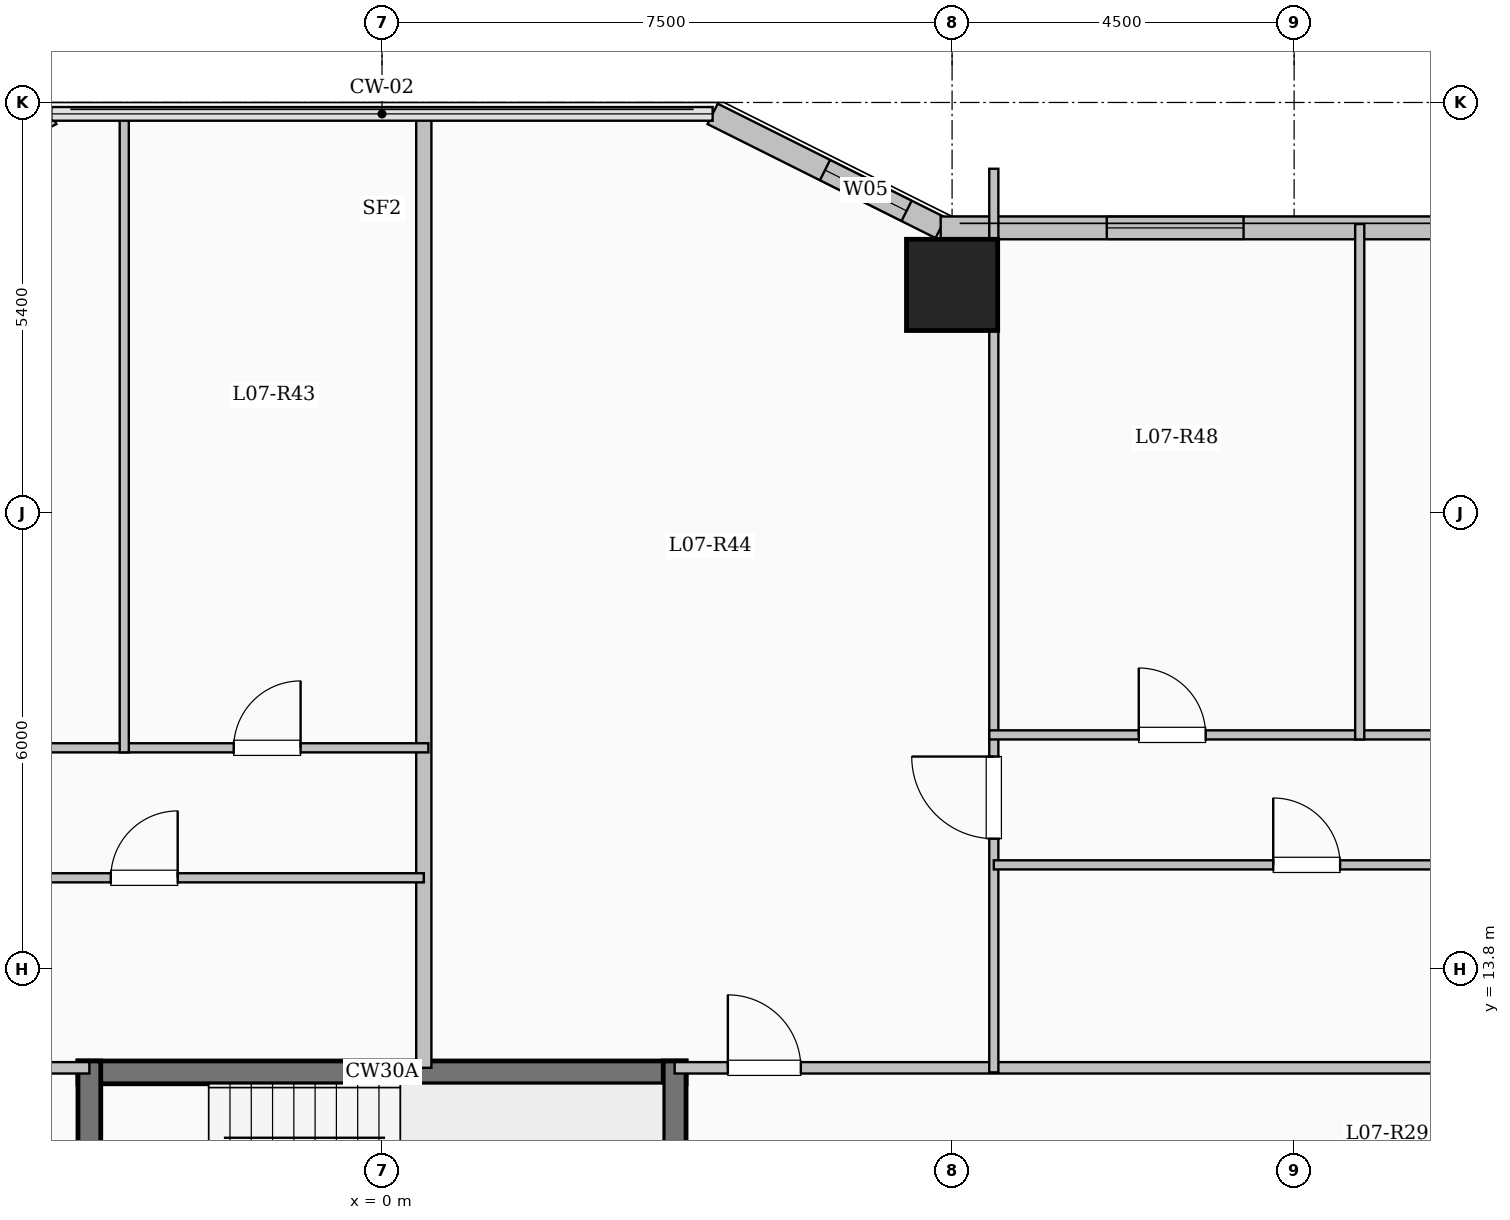
"""IFC4 building model, lengths in metres.
Left out: names, types, materials, properties, quantities, classifications, styles, units other than length and angle.
Written with IfcOpenShell. Run it as: python <this file> out.ifc"""

import sys

from ifc_helpers import new_model, si_unit, direction, frame, frame_2d, origin, origin_2d, place, context, subcontext, project, spatial, rectangle, extrude, element, fill, save


model = new_model("IFC4")
c1 = context("Model", 3, precision=1e-05, world=origin(), true_north=direction((0.0, 1.0)))
c2 = subcontext(c1, "Body", "Model", "MODEL_VIEW")
j1 = project(units=[si_unit("LENGTHUNIT", "METRE"), si_unit("PLANEANGLEUNIT", "RADIAN")], contexts=[c1])
p1 = place(None, origin())
s1 = spatial("IfcSite", under=j1, at=p1, CompositionType="ELEMENT")
p2 = place(p1, origin())
s2 = spatial("IfcBuilding", under=s1, at=p2, CompositionType="ELEMENT")
p3 = place(p2, frame((0.0, 0.0, 30.7)))
s3 = spatial("IfcBuildingStorey", under=s2, at=p3, CompositionType="ELEMENT", Elevation=30.7)
p4 = place(p3, frame((7.5, 22.8, 0.0), z_axis=(0.0, 0.0, 1.0), x_axis=(1.0, 0.0, 0.0)))
e1 = element("IfcColumn", 1, at=p4, inside=s3, PredefinedType="COLUMN", context=c2, shape_type="SweptSolid", body=[
    extrude(rectangle(XDim=1.2, YDim=1.2, at=origin_2d()), origin(), (0.0, 0.0, 1.0), 3.35),
])
p5 = place(p3, frame((-7.35, 23.55, 0.0), z_axis=(0.0, 0.0, 1.0), x_axis=(0.894427191, 0.4472135955, 0.0)))
e2 = element("IfcWall", 2, at=p5, inside=s3, PredefinedType="SOLIDWALL", context=c2, shape_type="SweptSolid", body=[
    extrude(rectangle(XDim=3.354, YDim=0.3, at=frame_2d((1.677, 0.0))), origin(), (0.0, 0.0, 1.0), 3.1),
])
p6 = place(p5, frame((0.777, 0.0, 0.9)))
e3 = element("IfcOpeningElement", 3, at=p6, cuts=e2, PredefinedType="OPENING", context=c2, shape_type="SweptSolid", body=[
    extrude(rectangle(XDim=1.8, YDim=1.65, at=frame_2d((0.9, 0.825))), frame((0.0, 0.16, 0.0), z_axis=(0.0, -1.0, 0.0), x_axis=(1.0, 0.0, 0.0)), (0.0, 0.0, 1.0), 0.32),
])
p7 = place(p3, frame((4.35, 25.05, 0.0), z_axis=(0.0, 0.0, 1.0), x_axis=(0.894427191, -0.4472135955, 0.0)))
e4 = element("IfcWall", 4, at=p7, inside=s3, PredefinedType="SOLIDWALL", context=c2, shape_type="SweptSolid", body=[
    extrude(rectangle(XDim=3.354, YDim=0.3, at=frame_2d((1.677, 0.0))), origin(), (0.0, 0.0, 1.0), 3.1),
])
p8 = place(p7, frame((1.653, 0.0, 0.95)))
e5 = element("IfcOpeningElement", 5, at=p8, cuts=e4, PredefinedType="OPENING", context=c2, shape_type="SweptSolid", body=[
    extrude(rectangle(XDim=1.2, YDim=1.5, at=frame_2d((0.6, 0.75))), frame((0.0, 0.16, 0.0), z_axis=(0.0, -1.0, 0.0), x_axis=(1.0, 0.0, 0.0)), (0.0, 0.0, 1.0), 0.32),
])
p9 = place(p3, frame((7.35, 23.55, 0.0), z_axis=(0.0, 0.0, 1.0), x_axis=(1.0, 0.0, 0.0)))
e6 = element("IfcWall", 6, at=p9, inside=s3, PredefinedType="SOLIDWALL", context=c2, shape_type="SweptSolid", body=[
    extrude(rectangle(XDim=15.3, YDim=0.3, at=frame_2d((7.65, 0.0))), origin(), (0.0, 0.0, 1.0), 3.1),
])
p10 = place(p9, frame((2.185, 0.0, 0.9)))
e7 = element("IfcOpeningElement", 7, at=p10, cuts=e6, PredefinedType="OPENING", context=c2, shape_type="SweptSolid", body=[
    extrude(rectangle(XDim=1.8, YDim=1.65, at=frame_2d((0.9, 0.825))), frame((0.0, 0.16, 0.0), z_axis=(0.0, -1.0, 0.0), x_axis=(1.0, 0.0, 0.0)), (0.0, 0.0, 1.0), 0.32),
])
p11 = place(p9, frame((7.001, 0.0, 0.9)))
e8 = element("IfcOpeningElement", 8, at=p11, cuts=e6, PredefinedType="OPENING", context=c2, shape_type="SweptSolid", body=[
    extrude(rectangle(XDim=1.8, YDim=1.65, at=frame_2d((0.9, 0.825))), frame((0.0, 0.16, 0.0), z_axis=(0.0, -1.0, 0.0), x_axis=(1.0, 0.0, 0.0)), (0.0, 0.0, 1.0), 0.32),
])
p12 = place(p9, frame((11.867, 0.0, 0.9)))
e9 = element("IfcOpeningElement", 9, at=p12, cuts=e6, PredefinedType="OPENING", context=c2, shape_type="SweptSolid", body=[
    extrude(rectangle(XDim=1.8, YDim=1.65, at=frame_2d((0.9, 0.825))), frame((0.0, 0.16, 0.0), z_axis=(0.0, -1.0, 0.0), x_axis=(1.0, 0.0, 0.0)), (0.0, 0.0, 1.0), 0.32),
])
p13 = place(p3, frame((-4.0, 12.44, 0.0), z_axis=(0.0, 0.0, 1.0), x_axis=(1.0, 0.0, 0.0)))
e10 = element("IfcWall", 10, at=p13, inside=s3, PredefinedType="SHEAR", context=c2, shape_type="SweptSolid", body=[
    extrude(rectangle(XDim=8.0, YDim=0.3, at=frame_2d((4.0, 0.0))), origin(), (0.0, 0.0, 1.0), 3.35),
])
for number, where, z_axis, x_axis in (
    (11, (-3.85, 9.0, 0.0), (0.0, 0.0, 1.0), (0.0, 1.0, 0.0)),
    (12, (3.85, 9.0, 0.0), (0.0, 0.0, 1.0), (0.0, 1.0, 0.0)),
):
    element("IfcWall", number, at=place(p3, frame(where, z_axis=z_axis, x_axis=x_axis)), inside=s3, PredefinedType="SHEAR", context=c2, shape_type="SweptSolid", body=[
        extrude(rectangle(XDim=3.59, YDim=0.3, at=frame_2d((1.795, 0.0))), origin(), (0.0, 0.0, 1.0), 3.35),
    ])
p14 = place(p3, frame((-22.55, 12.5, 0.0), z_axis=(0.0, 0.0, 1.0), x_axis=(1.0, 0.0, 0.0)))
e13 = element("IfcWall", 13, at=p14, inside=s3, PredefinedType="PARTITIONING", context=c2, shape_type="SweptSolid", body=[
    extrude(rectangle(XDim=18.7, YDim=0.15, at=frame_2d((9.35, 0.0))), origin(), (0.0, 0.0, 1.0), 3.1),
])
p15 = place(p14, frame((0.7, 0.0, 0.0)))
e14 = element("IfcOpeningElement", 14, at=p15, cuts=e13, PredefinedType="OPENING", context=c2, shape_type="SweptSolid", body=[
    extrude(rectangle(XDim=0.96, YDim=2.15, at=frame_2d((0.48, 1.075))), frame((0.0, 0.085, 0.0), z_axis=(0.0, -1.0, 0.0), x_axis=(1.0, 0.0, 0.0)), (0.0, 0.0, 1.0), 0.17),
])
p16 = place(p3, frame((3.85, 12.5, 0.0), z_axis=(0.0, 0.0, 1.0), x_axis=(1.0, 0.0, 0.0)))
e15 = element("IfcWall", 15, at=p16, inside=s3, PredefinedType="PARTITIONING", context=c2, shape_type="SweptSolid", body=[
    extrude(rectangle(XDim=18.7, YDim=0.15, at=frame_2d((9.35, 0.0))), origin(), (0.0, 0.0, 1.0), 3.1),
])
p17 = place(p16, frame((0.7, 0.0, 0.0)))
e16 = element("IfcOpeningElement", 16, at=p17, cuts=e15, PredefinedType="OPENING", context=c2, shape_type="SweptSolid", body=[
    extrude(rectangle(XDim=0.96, YDim=2.15, at=frame_2d((0.48, 1.075))), frame((0.0, 0.085, 0.0), z_axis=(0.0, -1.0, 0.0), x_axis=(1.0, 0.0, 0.0)), (0.0, 0.0, 1.0), 0.17),
])
p18 = place(p3, frame((0.55, 12.5, 0.0), z_axis=(0.0, 0.0, 1.0), x_axis=(0.0, 1.0, 0.0)))
e17 = element("IfcWall", 17, at=p18, inside=s3, PredefinedType="SOLIDWALL", context=c2, shape_type="SweptSolid", body=[
    extrude(rectangle(XDim=12.58, YDim=0.2, at=frame_2d((6.29, 0.0))), origin(), (0.0, 0.0, 1.0), 3.1),
])
p19 = place(p3, frame((-6.807, 15.0, 0.0), z_axis=(0.0, 0.0, 1.0), x_axis=(1.0, 0.0, 0.0)))
e18 = element("IfcWall", 18, at=p19, inside=s3, PredefinedType="PARTITIONING", context=c2, shape_type="SweptSolid", body=[
    extrude(rectangle(XDim=7.357, YDim=0.12, at=frame_2d((3.678, 0.0))), origin(), (0.0, 0.0, 1.0), 2.585),
])
p20 = place(p19, frame((3.239, 0.0, 0.0)))
e19 = element("IfcOpeningElement", 19, at=p20, cuts=e18, PredefinedType="OPENING", context=c2, shape_type="SweptSolid", body=[
    extrude(rectangle(XDim=0.88, YDim=2.1, at=frame_2d((0.44, 1.05))), frame((0.0, 0.07, 0.0), z_axis=(0.0, -1.0, 0.0), x_axis=(1.0, 0.0, 0.0)), (0.0, 0.0, 1.0), 0.14),
])
p21 = place(p3, frame((-15.095, 16.71, 0.0), z_axis=(0.0, 0.0, 1.0), x_axis=(1.0, 0.0, 0.0)))
e20 = element("IfcWall", 20, at=p21, inside=s3, PredefinedType="PARTITIONING", context=c2, shape_type="SweptSolid", body=[
    extrude(rectangle(XDim=15.705, YDim=0.12, at=frame_2d((7.853, 0.0))), origin(), (0.0, 0.0, 1.0), 2.585),
])
p22 = place(p21, frame((1.501, 0.0, 0.0)))
e21 = element("IfcOpeningElement", 21, at=p22, cuts=e20, PredefinedType="OPENING", context=c2, shape_type="SweptSolid", body=[
    extrude(rectangle(XDim=0.88, YDim=2.1, at=frame_2d((0.44, 1.05))), frame((0.0, 0.07, 0.0), z_axis=(0.0, -1.0, 0.0), x_axis=(1.0, 0.0, 0.0)), (0.0, 0.0, 1.0), 0.14),
])
p23 = place(p21, frame((5.382, 0.0, 0.0)))
e22 = element("IfcOpeningElement", 22, at=p23, cuts=e20, PredefinedType="OPENING", context=c2, shape_type="SweptSolid", body=[
    extrude(rectangle(XDim=0.88, YDim=2.1, at=frame_2d((0.44, 1.05))), frame((0.0, 0.07, 0.0), z_axis=(0.0, -1.0, 0.0), x_axis=(1.0, 0.0, 0.0)), (0.0, 0.0, 1.0), 0.14),
])
p24 = place(p21, frame((9.263, 0.0, 0.0)))
e23 = element("IfcOpeningElement", 23, at=p24, cuts=e20, PredefinedType="OPENING", context=c2, shape_type="SweptSolid", body=[
    extrude(rectangle(XDim=0.88, YDim=2.1, at=frame_2d((0.44, 1.05))), frame((0.0, 0.07, 0.0), z_axis=(0.0, -1.0, 0.0), x_axis=(1.0, 0.0, 0.0)), (0.0, 0.0, 1.0), 0.14),
])
p25 = place(p21, frame((13.144, 0.0, 0.0)))
e24 = element("IfcOpeningElement", 24, at=p25, cuts=e20, PredefinedType="OPENING", context=c2, shape_type="SweptSolid", body=[
    extrude(rectangle(XDim=0.88, YDim=2.1, at=frame_2d((0.44, 1.05))), frame((0.0, 0.07, 0.0), z_axis=(0.0, -1.0, 0.0), x_axis=(1.0, 0.0, 0.0)), (0.0, 0.0, 1.0), 0.14),
])
p26 = place(p3, frame((-3.391, 16.65, 0.0), z_axis=(0.0, 0.0, 1.0), x_axis=(0.0, 1.0, 0.0)))
e25 = element("IfcWall", 25, at=p26, inside=s3, PredefinedType="PARTITIONING", context=c2, shape_type="SweptSolid", body=[
    extrude(rectangle(XDim=8.43, YDim=0.12, at=frame_2d((4.215, 0.0))), origin(), (0.0, 0.0, 1.0), 3.1),
])
p27 = place(p3, frame((8.049, 12.44, 0.0), z_axis=(0.0, 0.0, 1.0), x_axis=(0.0, 1.0, 0.0)))
e26 = element("IfcWall", 26, at=p27, inside=s3, PredefinedType="PARTITIONING", context=c2, shape_type="SweptSolid", body=[
    extrude(rectangle(XDim=11.888, YDim=0.12, at=frame_2d((5.944, 0.0))), origin(), (0.0, 0.0, 1.0), 2.435),
])
p28 = place(p27, frame((3.075, 0.0, 0.0)))
e27 = element("IfcOpeningElement", 27, at=p28, cuts=e26, PredefinedType="OPENING", context=c2, shape_type="SweptSolid", body=[
    extrude(rectangle(XDim=1.08, YDim=2.15, at=frame_2d((0.54, 1.075))), frame((0.0, 0.07, 0.0), z_axis=(0.0, -1.0, 0.0), x_axis=(1.0, 0.0, 0.0)), (0.0, 0.0, 1.0), 0.14),
])
p29 = place(p3, frame((8.049, 15.17, 0.0), z_axis=(0.0, 0.0, 1.0), x_axis=(1.0, 0.0, 0.0)))
e28 = element("IfcWall", 28, at=p29, inside=s3, PredefinedType="PARTITIONING", context=c2, shape_type="SweptSolid", body=[
    extrude(rectangle(XDim=8.231, YDim=0.12, at=frame_2d((4.115, 0.0))), origin(), (0.0, 0.0, 1.0), 3.1),
])
p30 = place(p29, frame((3.676, 0.0, 0.0)))
e29 = element("IfcOpeningElement", 29, at=p30, cuts=e28, PredefinedType="OPENING", context=c2, shape_type="SweptSolid", body=[
    extrude(rectangle(XDim=0.88, YDim=2.1, at=frame_2d((0.44, 1.05))), frame((0.0, 0.07, 0.0), z_axis=(0.0, -1.0, 0.0), x_axis=(1.0, 0.0, 0.0)), (0.0, 0.0, 1.0), 0.14),
])
p31 = place(p3, frame((7.989, 16.88, 0.0), z_axis=(0.0, 0.0, 1.0), x_axis=(1.0, 0.0, 0.0)))
e30 = element("IfcWall", 30, at=p31, inside=s3, PredefinedType="PARTITIONING", context=c2, shape_type="SweptSolid", body=[
    extrude(rectangle(XDim=14.621, YDim=0.12, at=frame_2d((7.311, 0.0))), origin(), (0.0, 0.0, 1.0), 3.1),
])
p32 = place(p31, frame((1.967, 0.0, 0.0)))
e31 = element("IfcOpeningElement", 31, at=p32, cuts=e30, PredefinedType="OPENING", context=c2, shape_type="SweptSolid", body=[
    extrude(rectangle(XDim=0.88, YDim=2.1, at=frame_2d((0.44, 1.05))), frame((0.0, 0.07, 0.0), z_axis=(0.0, -1.0, 0.0), x_axis=(1.0, 0.0, 0.0)), (0.0, 0.0, 1.0), 0.14),
])
p33 = place(p31, frame((6.781, 0.0, 0.0)))
e32 = element("IfcOpeningElement", 32, at=p33, cuts=e30, PredefinedType="OPENING", context=c2, shape_type="SweptSolid", body=[
    extrude(rectangle(XDim=0.88, YDim=2.1, at=frame_2d((0.44, 1.05))), frame((0.0, 0.07, 0.0), z_axis=(0.0, -1.0, 0.0), x_axis=(1.0, 0.0, 0.0)), (0.0, 0.0, 1.0), 0.14),
])
p34 = place(p31, frame((11.594, 0.0, 0.0)))
e33 = element("IfcOpeningElement", 33, at=p34, cuts=e30, PredefinedType="OPENING", context=c2, shape_type="SweptSolid", body=[
    extrude(rectangle(XDim=0.88, YDim=2.1, at=frame_2d((0.44, 1.05))), frame((0.0, 0.07, 0.0), z_axis=(0.0, -1.0, 0.0), x_axis=(1.0, 0.0, 0.0)), (0.0, 0.0, 1.0), 0.14),
])
p35 = place(p3, frame((12.863, 16.82, 0.0), z_axis=(0.0, 0.0, 1.0), x_axis=(0.0, 1.0, 0.0)))
e34 = element("IfcWall", 34, at=p35, inside=s3, PredefinedType="PARTITIONING", context=c2, shape_type="SweptSolid", body=[
    extrude(rectangle(XDim=6.78, YDim=0.12, at=frame_2d((3.39, 0.0))), origin(), (0.0, 0.0, 1.0), 3.1),
])
p36 = place(p8, origin())
e35 = element("IfcWindow", 35, at=p36, inside=s3, PartitioningType="SINGLE_PANEL", PredefinedType="WINDOW", context=c2, shape_type="SweptSolid", body=[
    extrude(rectangle(XDim=1.2, YDim=1.5, at=frame_2d((0.6, 0.75))), frame((0.0, 0.03, 0.0), z_axis=(0.0, -1.0, 0.0), x_axis=(1.0, 0.0, 0.0)), (0.0, 0.0, 1.0), 0.06),
])
fill(e5, e35)
p37 = place(p10, origin())
e36 = element("IfcWindow", 36, at=p37, inside=s3, PartitioningType="SINGLE_PANEL", PredefinedType="WINDOW", context=c2, shape_type="SweptSolid", body=[
    extrude(rectangle(XDim=1.8, YDim=1.65, at=frame_2d((0.9, 0.825))), frame((0.0, 0.03, 0.0), z_axis=(0.0, -1.0, 0.0), x_axis=(1.0, 0.0, 0.0)), (0.0, 0.0, 1.0), 0.06),
])
fill(e7, e36)
p38 = place(p20, origin())
e37 = element("IfcDoor", 37, at=p38, inside=s3, OperationType="SINGLE_SWING_RIGHT", PredefinedType="DOOR", context=c2, shape_type="SweptSolid", body=[
    extrude(rectangle(XDim=0.88, YDim=2.1, at=frame_2d((0.44, 1.05))), frame((0.0, 0.025, 0.0), z_axis=(0.0, -1.0, 0.0), x_axis=(1.0, 0.0, 0.0)), (0.0, 0.0, 1.0), 0.05),
])
fill(e19, e37)
p39 = place(p25, origin())
e38 = element("IfcDoor", 38, at=p39, inside=s3, OperationType="SINGLE_SWING_RIGHT", PredefinedType="DOOR", context=c2, shape_type="SweptSolid", body=[
    extrude(rectangle(XDim=0.88, YDim=2.1, at=frame_2d((0.44, 1.05))), frame((0.0, 0.025, 0.0), z_axis=(0.0, -1.0, 0.0), x_axis=(1.0, 0.0, 0.0)), (0.0, 0.0, 1.0), 0.05),
])
fill(e24, e38)
p40 = place(p17, origin())
e39 = element("IfcDoor", 39, at=p40, inside=s3, OperationType="SINGLE_SWING_LEFT", PredefinedType="DOOR", context=c2, shape_type="SweptSolid", body=[
    extrude(rectangle(XDim=0.96, YDim=2.15, at=frame_2d((0.48, 1.075))), frame((0.0, 0.025, 0.0), z_axis=(0.0, -1.0, 0.0), x_axis=(1.0, 0.0, 0.0)), (0.0, 0.0, 1.0), 0.05),
])
fill(e16, e39)
p41 = place(p28, origin())
e40 = element("IfcDoor", 40, at=p41, inside=s3, OperationType="SINGLE_SWING_RIGHT", PredefinedType="DOOR", context=c2, shape_type="SweptSolid", body=[
    extrude(rectangle(XDim=1.08, YDim=2.15, at=frame_2d((0.54, 1.075))), frame((0.0, 0.025, 0.0), z_axis=(0.0, -1.0, 0.0), x_axis=(1.0, 0.0, 0.0)), (0.0, 0.0, 1.0), 0.05),
])
fill(e27, e40)
p42 = place(p30, origin())
e41 = element("IfcDoor", 41, at=p42, inside=s3, OperationType="SINGLE_SWING_LEFT", PredefinedType="DOOR", context=c2, shape_type="SweptSolid", body=[
    extrude(rectangle(XDim=0.88, YDim=2.1, at=frame_2d((0.44, 1.05))), frame((0.0, 0.025, 0.0), z_axis=(0.0, -1.0, 0.0), x_axis=(1.0, 0.0, 0.0)), (0.0, 0.0, 1.0), 0.05),
])
fill(e29, e41)
p43 = place(p32, origin())
e42 = element("IfcDoor", 42, at=p43, inside=s3, OperationType="SINGLE_SWING_LEFT", PredefinedType="DOOR", context=c2, shape_type="SweptSolid", body=[
    extrude(rectangle(XDim=0.88, YDim=2.1, at=frame_2d((0.44, 1.05))), frame((0.0, 0.025, 0.0), z_axis=(0.0, -1.0, 0.0), x_axis=(1.0, 0.0, 0.0)), (0.0, 0.0, 1.0), 0.05),
])
fill(e31, e42)
save(model, sys.argv[1])
